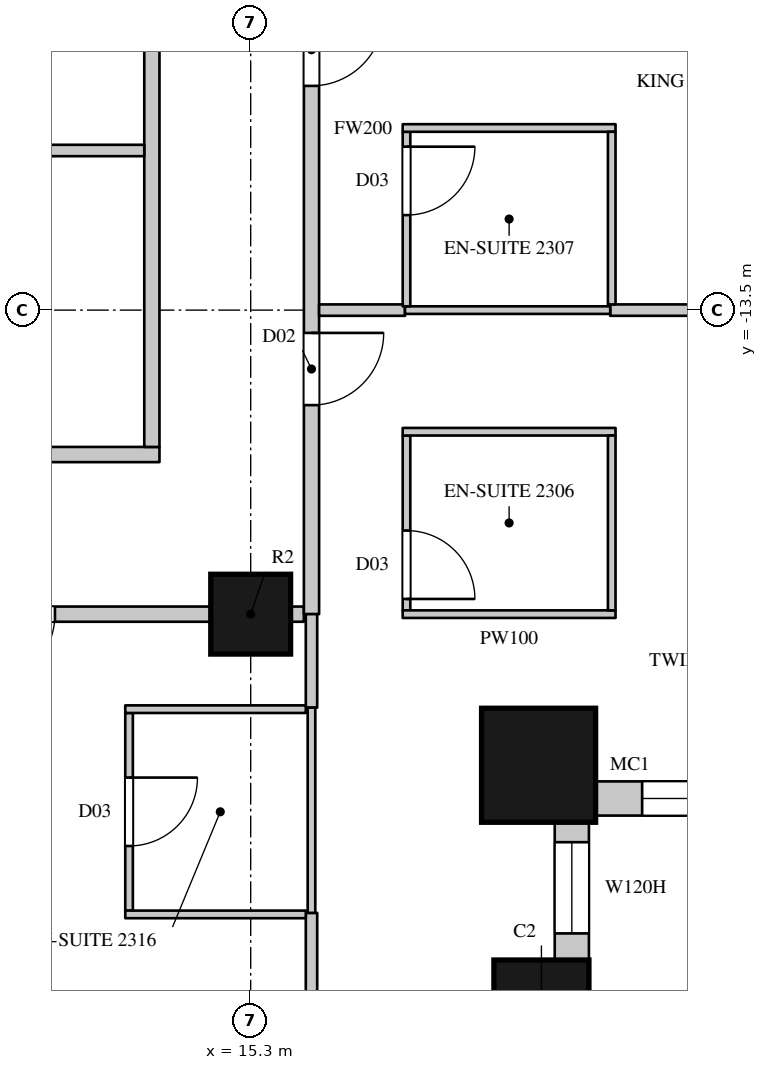
"""IFC4 building model, lengths in metres.
Left out: names, types, materials, properties, quantities, classifications, styles, units other than length and angle.
Written with IfcOpenShell. Run it as: python <this file> out.ifc"""

import sys

from ifc_helpers import new_model, si_unit, direction, frame, frame_2d, origin, origin_2d, place, context, subcontext, project, spatial, rectangle, circle, extrude, element, fill, save


model = new_model("IFC4")
c1 = context("Model", 3, precision=1e-05, world=origin(), true_north=direction((0.0, 1.0)))
c2 = subcontext(c1, "Body", "Model", "MODEL_VIEW")
j1 = project(units=[si_unit("LENGTHUNIT", "METRE"), si_unit("PLANEANGLEUNIT", "RADIAN")], contexts=[c1])
p1 = place(None, origin())
s1 = spatial("IfcSite", under=j1, at=p1, CompositionType="ELEMENT")
p2 = place(p1, origin())
s2 = spatial("IfcBuilding", under=s1, at=p2, CompositionType="ELEMENT")
p3 = place(p2, frame((0.0, 0.0, 113.1)))
s3 = spatial("IfcBuildingStorey", under=s2, at=p3, CompositionType="ELEMENT", Elevation=113.1)
p4 = place(p3, frame((19.125, -22.5, 0.0), z_axis=(0.0, 0.0, 1.0), x_axis=(0.0, 1.0, 0.0)))
e1 = element("IfcColumn", 1, at=p4, inside=s3, PredefinedType="COLUMN", context=c2, shape_type="SweptSolid", body=[
    extrude(rectangle(XDim=0.9, YDim=1.25, at=origin_2d()), origin(), (0.0, 0.0, 1.0), 3.6),
])
p5 = place(p3, frame((19.088, -19.488, 0.0), z_axis=(0.0, 0.0, 1.0), x_axis=(1.0, 0.0, 0.0)))
e2 = element("IfcColumn", 2, at=p5, inside=s3, PredefinedType="COLUMN", context=c2, shape_type="SweptSolid", body=[
    extrude(circle(Radius=0.75, at=origin_2d()), origin(), (0.0, 0.0, 1.0), 3.6),
])
p6 = place(p3, frame((15.3, -17.5, 0.0), z_axis=(0.0, 0.0, 1.0), x_axis=(1.0, 0.0, 0.0)))
e3 = element("IfcColumn", 3, at=p6, inside=s3, PredefinedType="COLUMN", context=c2, shape_type="SweptSolid", body=[
    extrude(circle(Radius=0.525, at=origin_2d()), origin(), (0.0, 0.0, 1.0), 3.6),
])
p7 = place(p3, frame((19.525, -22.05, 0.0), z_axis=(0.0, 0.0, 1.0), x_axis=(0.0, 1.0, 0.0)))
e4 = element("IfcWall", 4, at=p7, inside=s3, PredefinedType="SOLIDWALL", context=c2, shape_type="SweptSolid", body=[
    extrude(rectangle(XDim=1.843, YDim=0.45, at=frame_2d((0.921, 0.0))), origin(), (0.0, 0.0, 1.0), 3.3),
])
p8 = place(p7, frame((0.35, 0.0, 1.05)))
e5 = element("IfcOpeningElement", 5, at=p8, cuts=e4, PredefinedType="OPENING", context=c2, shape_type="SweptSolid", body=[
    extrude(rectangle(XDim=1.2, YDim=2.0, at=frame_2d((0.6, 1.0))), frame((0.0, 0.235, 0.0), z_axis=(0.0, -1.0, 0.0), x_axis=(1.0, 0.0, 0.0)), (0.0, 0.0, 1.0), 0.47),
])
p9 = place(p3, frame((19.807, -19.925, 0.0), z_axis=(0.0, 0.0, 1.0), x_axis=(1.0, 0.0, 0.0)))
e6 = element("IfcWall", 6, at=p9, inside=s3, PredefinedType="SOLIDWALL", context=c2, shape_type="SweptSolid", body=[
    extrude(rectangle(XDim=3.857, YDim=0.45, at=frame_2d((1.928, 0.0))), origin(), (0.0, 0.0, 1.0), 3.3),
])
p10 = place(p9, frame((0.643, 0.0, 1.05)))
e7 = element("IfcOpeningElement", 7, at=p10, cuts=e6, PredefinedType="OPENING", context=c2, shape_type="SweptSolid", body=[
    extrude(rectangle(XDim=2.7, YDim=2.0, at=frame_2d((1.35, 1.0))), frame((0.0, 0.235, 0.0), z_axis=(0.0, -1.0, 0.0), x_axis=(1.0, 0.0, 0.0)), (0.0, 0.0, 1.0), 0.47),
])
p11 = place(p3, frame((6.825, -17.5, 0.0), z_axis=(0.0, 0.0, 1.0), x_axis=(1.0, 0.0, 0.0)))
e8 = element("IfcWall", 8, at=p11, inside=s3, PredefinedType="PARTITIONING", context=c2, shape_type="SweptSolid", body=[
    extrude(rectangle(XDim=7.95, YDim=0.2, at=frame_2d((3.975, 0.0))), origin(), (0.0, 0.0, 1.0), 2.75),
])
p12 = place(p11, frame((2.45, 0.0, 0.0)))
e9 = element("IfcOpeningElement", 9, at=p12, cuts=e8, PredefinedType="OPENING", context=c2, shape_type="SweptSolid", body=[
    extrude(rectangle(XDim=0.95, YDim=2.2, at=frame_2d((0.475, 1.1))), frame((0.0, 0.11, 0.0), z_axis=(0.0, -1.0, 0.0), x_axis=(1.0, 0.0, 0.0)), (0.0, 0.0, 1.0), 0.22),
])
p13 = place(p11, frame((4.95, 0.0, 0.0)))
e10 = element("IfcOpeningElement", 10, at=p13, cuts=e8, PredefinedType="OPENING", context=c2, shape_type="SweptSolid", body=[
    extrude(rectangle(XDim=0.95, YDim=2.2, at=frame_2d((0.475, 1.1))), frame((0.0, 0.11, 0.0), z_axis=(0.0, -1.0, 0.0), x_axis=(1.0, 0.0, 0.0)), (0.0, 0.0, 1.0), 0.22),
])
p14 = place(p3, frame((15.825, -17.5, 0.0), z_axis=(0.0, 0.0, 1.0), x_axis=(1.0, 0.0, 0.0)))
e11 = element("IfcWall", 11, at=p14, inside=s3, PredefinedType="PARTITIONING", context=c2, shape_type="SweptSolid", body=[
    extrude(rectangle(XDim=0.175, YDim=0.2, at=frame_2d((0.087, 0.0))), origin(), (0.0, 0.0, 1.0), 3.3),
])
p15 = place(p3, frame((-6.1, -15.4, 0.0), z_axis=(0.0, 0.0, 1.0), x_axis=(1.0, 0.0, 0.0)))
e12 = element("IfcWall", 12, at=p15, inside=s3, PredefinedType="PARTITIONING", context=c2, shape_type="SweptSolid", body=[
    extrude(rectangle(XDim=20.2, YDim=0.2, at=frame_2d((10.1, 0.0))), origin(), (0.0, 0.0, 1.0), 3.3),
])
p16 = place(p15, frame((5.95, 0.0, 0.0)))
e13 = element("IfcOpeningElement", 13, at=p16, cuts=e12, PredefinedType="OPENING", context=c2, shape_type="SweptSolid", body=[
    extrude(rectangle(XDim=0.9, YDim=2.2, at=frame_2d((0.45, 1.1))), frame((0.0, 0.11, 0.0), z_axis=(0.0, -1.0, 0.0), x_axis=(1.0, 0.0, 0.0)), (0.0, 0.0, 1.0), 0.22),
])
p17 = place(p15, frame((16.1, 0.0, 0.0)))
e14 = element("IfcOpeningElement", 14, at=p17, cuts=e12, PredefinedType="OPENING", context=c2, shape_type="SweptSolid", body=[
    extrude(rectangle(XDim=0.9, YDim=2.2, at=frame_2d((0.45, 1.1))), frame((0.0, 0.11, 0.0), z_axis=(0.0, -1.0, 0.0), x_axis=(1.0, 0.0, 0.0)), (0.0, 0.0, 1.0), 0.22),
])
p18 = place(p3, frame((14.0, -15.3, 0.0), z_axis=(0.0, 0.0, 1.0), x_axis=(0.0, 1.0, 0.0)))
e15 = element("IfcWall", 15, at=p18, inside=s3, PredefinedType="PARTITIONING", context=c2, shape_type="SweptSolid", body=[
    extrude(rectangle(XDim=8.475, YDim=0.2, at=frame_2d((4.238, 0.0))), origin(), (0.0, 0.0, 1.0), 3.3),
])
p19 = place(p3, frame((16.1, -17.5, 0.0), z_axis=(0.0, 0.0, 1.0), x_axis=(0.0, 1.0, 0.0)))
e16 = element("IfcWall", 16, at=p19, inside=s3, PredefinedType="PARTITIONING", context=c2, shape_type="SweptSolid", body=[
    extrude(rectangle(XDim=12.75, YDim=0.2, at=frame_2d((6.375, 0.0))), origin(), (0.0, 0.0, 1.0), 3.3),
])
p20 = place(p19, frame((2.75, 0.0, 0.0)))
e17 = element("IfcOpeningElement", 17, at=p20, cuts=e16, PredefinedType="OPENING", context=c2, shape_type="SweptSolid", body=[
    extrude(rectangle(XDim=0.95, YDim=2.2, at=frame_2d((0.475, 1.1))), frame((0.0, 0.11, 0.0), z_axis=(0.0, -1.0, 0.0), x_axis=(1.0, 0.0, 0.0)), (0.0, 0.0, 1.0), 0.22),
])
p21 = place(p19, frame((6.95, 0.0, 0.0)))
e18 = element("IfcOpeningElement", 18, at=p21, cuts=e16, PredefinedType="OPENING", context=c2, shape_type="SweptSolid", body=[
    extrude(rectangle(XDim=0.95, YDim=2.2, at=frame_2d((0.475, 1.1))), frame((0.0, 0.11, 0.0), z_axis=(0.0, -1.0, 0.0), x_axis=(1.0, 0.0, 0.0)), (0.0, 0.0, 1.0), 0.22),
])
p22 = place(p19, frame((11.4, 0.0, 0.0)))
e19 = element("IfcOpeningElement", 19, at=p22, cuts=e16, PredefinedType="OPENING", context=c2, shape_type="SweptSolid", body=[
    extrude(rectangle(XDim=0.95, YDim=2.2, at=frame_2d((0.475, 1.1))), frame((0.0, 0.11, 0.0), z_axis=(0.0, -1.0, 0.0), x_axis=(1.0, 0.0, 0.0)), (0.0, 0.0, 1.0), 0.22),
])
p23 = place(p3, frame((10.4, -11.4, 0.0), z_axis=(0.0, 0.0, 1.0), x_axis=(1.0, 0.0, 0.0)))
e20 = element("IfcWall", 20, at=p23, inside=s3, PredefinedType="PARTITIONING", context=c2, shape_type="SweptSolid", body=[
    extrude(rectangle(XDim=3.5, YDim=0.15, at=frame_2d((1.75, 0.0))), origin(), (0.0, 0.0, 1.0), 3.3),
])
p24 = place(p3, frame((16.1, -25.7, 0.0), z_axis=(0.0, 0.0, 1.0), x_axis=(0.0, 1.0, 0.0)))
e21 = element("IfcWall", 21, at=p24, inside=s3, PredefinedType="PARTITIONING", context=c2, shape_type="SweptSolid", body=[
    extrude(rectangle(XDim=4.27, YDim=0.15, at=frame_2d((2.135, 0.0))), origin(), (0.0, 0.0, 1.0), 3.3),
])
p25 = place(p3, frame((16.1, -18.73, 0.0), z_axis=(0.0, 0.0, 1.0), x_axis=(0.0, 1.0, 0.0)))
e22 = element("IfcWall", 22, at=p25, inside=s3, PredefinedType="PARTITIONING", context=c2, shape_type="SweptSolid", body=[
    extrude(rectangle(XDim=1.23, YDim=0.15, at=frame_2d((0.615, 0.0))), origin(), (0.0, 0.0, 1.0), 3.3),
])
p26 = place(p3, frame((16.2, -13.5, 0.0), z_axis=(0.0, 0.0, 1.0), x_axis=(1.0, 0.0, 0.0)))
e23 = element("IfcWall", 23, at=p26, inside=s3, PredefinedType="PARTITIONING", context=c2, shape_type="SweptSolid", body=[
    extrude(rectangle(XDim=1.13, YDim=0.15, at=frame_2d((0.565, 0.0))), origin(), (0.0, 0.0, 1.0), 3.3),
])
p27 = place(p3, frame((20.03, -13.5, 0.0), z_axis=(0.0, 0.0, 1.0), x_axis=(1.0, 0.0, 0.0)))
e24 = element("IfcWall", 24, at=p27, inside=s3, PredefinedType="PARTITIONING", context=c2, shape_type="SweptSolid", body=[
    extrude(rectangle(XDim=3.47, YDim=0.15, at=frame_2d((1.735, 0.0))), origin(), (0.0, 0.0, 1.0), 3.3),
])
p28 = place(p3, frame((13.7, -21.4, 0.0), z_axis=(0.0, 0.0, 1.0), x_axis=(0.0, 1.0, 0.0)))
e25 = element("IfcWall", 25, at=p28, inside=s3, PredefinedType="PARTITIONING", context=c2, shape_type="SweptSolid", body=[
    extrude(rectangle(XDim=2.6, YDim=0.1, at=frame_2d((1.3, 0.0))), origin(), (0.0, 0.0, 1.0), 3.3),
])
p29 = place(p28, frame((0.85, 0.0, 0.0)))
e26 = element("IfcOpeningElement", 26, at=p29, cuts=e25, PredefinedType="OPENING", context=c2, shape_type="SweptSolid", body=[
    extrude(rectangle(XDim=0.9, YDim=2.2, at=frame_2d((0.45, 1.1))), frame((0.0, 0.06, 0.0), z_axis=(0.0, -1.0, 0.0), x_axis=(1.0, 0.0, 0.0)), (0.0, 0.0, 1.0), 0.12),
])
for number, where, z_axis, x_axis in (
    (27, (13.65, -21.45, 0.0), (0.0, 0.0, 1.0), (1.0, 0.0, 0.0)),
    (28, (13.65, -18.75, 0.0), (0.0, 0.0, 1.0), (1.0, 0.0, 0.0)),
):
    element("IfcWall", number, at=place(p3, frame(where, z_axis=z_axis, x_axis=x_axis)), inside=s3, PredefinedType="PARTITIONING", context=c2, shape_type="SweptSolid", body=[
        extrude(rectangle(XDim=2.375, YDim=0.1, at=frame_2d((1.188, 0.0))), origin(), (0.0, 0.0, 1.0), 3.3),
    ])
for number, where, z_axis, x_axis in (
    (29, (16.1, -21.43, 0.0), (0.0, 0.0, 1.0), (0.0, 1.0, 0.0)),
    (30, (17.33, -13.5, 0.0), (0.0, 0.0, 1.0), (1.0, 0.0, 0.0)),
):
    element("IfcWall", number, at=place(p3, frame(where, z_axis=z_axis, x_axis=x_axis)), inside=s3, PredefinedType="PARTITIONING", context=c2, shape_type="SweptSolid", body=[
        extrude(rectangle(XDim=2.7, YDim=0.1, at=frame_2d((1.35, 0.0))), origin(), (0.0, 0.0, 1.0), 3.3),
    ])
p30 = place(p3, frame((17.35, -17.45, 0.0), z_axis=(0.0, 0.0, 1.0), x_axis=(0.0, 1.0, 0.0)))
e31 = element("IfcWall", 31, at=p30, inside=s3, PredefinedType="PARTITIONING", context=c2, shape_type="SweptSolid", body=[
    extrude(rectangle(XDim=2.3, YDim=0.1, at=frame_2d((1.15, 0.0))), origin(), (0.0, 0.0, 1.0), 3.3),
])
p31 = place(p30, frame((0.15, 0.0, 0.0)))
e32 = element("IfcOpeningElement", 32, at=p31, cuts=e31, PredefinedType="OPENING", context=c2, shape_type="SweptSolid", body=[
    extrude(rectangle(XDim=0.9, YDim=2.2, at=frame_2d((0.45, 1.1))), frame((0.0, 0.06, 0.0), z_axis=(0.0, -1.0, 0.0), x_axis=(1.0, 0.0, 0.0)), (0.0, 0.0, 1.0), 0.12),
])
for number, where, z_axis, x_axis in (
    (33, (17.3, -17.5, 0.0), (0.0, 0.0, 1.0), (1.0, 0.0, 0.0)),
    (34, (17.3, -15.1, 0.0), (0.0, 0.0, 1.0), (1.0, 0.0, 0.0)),
):
    element("IfcWall", number, at=place(p3, frame(where, z_axis=z_axis, x_axis=x_axis)), inside=s3, PredefinedType="PARTITIONING", context=c2, shape_type="SweptSolid", body=[
        extrude(rectangle(XDim=2.8, YDim=0.1, at=frame_2d((1.4, 0.0))), origin(), (0.0, 0.0, 1.0), 3.3),
    ])
p32 = place(p3, frame((17.35, -13.45, 0.0), z_axis=(0.0, 0.0, 1.0), x_axis=(0.0, 1.0, 0.0)))
e35 = element("IfcWall", 35, at=p32, inside=s3, PredefinedType="PARTITIONING", context=c2, shape_type="SweptSolid", body=[
    extrude(rectangle(XDim=2.296, YDim=0.1, at=frame_2d((1.148, 0.0))), origin(), (0.0, 0.0, 1.0), 3.3),
])
p33 = place(p32, frame((1.2, 0.0, 0.0)))
e36 = element("IfcOpeningElement", 36, at=p33, cuts=e35, PredefinedType="OPENING", context=c2, shape_type="SweptSolid", body=[
    extrude(rectangle(XDim=0.9, YDim=2.2, at=frame_2d((0.45, 1.1))), frame((0.0, 0.06, 0.0), z_axis=(0.0, -1.0, 0.0), x_axis=(1.0, 0.0, 0.0)), (0.0, 0.0, 1.0), 0.12),
])
p34 = place(p3, frame((17.3, -11.104, 0.0), z_axis=(0.0, 0.0, 1.0), x_axis=(1.0, 0.0, 0.0)))
e37 = element("IfcWall", 37, at=p34, inside=s3, PredefinedType="PARTITIONING", context=c2, shape_type="SweptSolid", body=[
    extrude(rectangle(XDim=2.8, YDim=0.1, at=frame_2d((1.4, 0.0))), origin(), (0.0, 0.0, 1.0), 3.3),
])
p35 = place(p3, frame((20.05, -17.45, 0.0), z_axis=(0.0, 0.0, 1.0), x_axis=(0.0, 1.0, 0.0)))
e38 = element("IfcWall", 38, at=p35, inside=s3, PredefinedType="PARTITIONING", context=c2, shape_type="SweptSolid", body=[
    extrude(rectangle(XDim=2.3, YDim=0.1, at=frame_2d((1.15, 0.0))), origin(), (0.0, 0.0, 1.0), 3.3),
])
p36 = place(p3, frame((20.05, -13.425, 0.0), z_axis=(0.0, 0.0, 1.0), x_axis=(0.0, 1.0, 0.0)))
e39 = element("IfcWall", 39, at=p36, inside=s3, PredefinedType="PARTITIONING", context=c2, shape_type="SweptSolid", body=[
    extrude(rectangle(XDim=2.271, YDim=0.1, at=frame_2d((1.135, 0.0))), origin(), (0.0, 0.0, 1.0), 3.3),
])
p37 = place(p8, origin())
e40 = element("IfcWindow", 40, at=p37, inside=s3, PartitioningType="SINGLE_PANEL", PredefinedType="WINDOW", context=c2, shape_type="SweptSolid", body=[
    extrude(rectangle(XDim=1.2, YDim=2.0, at=frame_2d((0.6, 1.0))), frame((0.0, 0.135, 0.0), z_axis=(0.0, -1.0, 0.0), x_axis=(1.0, 0.0, 0.0)), (0.0, 0.0, 1.0), 0.06),
])
fill(e5, e40)
p38 = place(p10, origin())
e41 = element("IfcWindow", 41, at=p38, inside=s3, PartitioningType="SINGLE_PANEL", PredefinedType="WINDOW", context=c2, shape_type="SweptSolid", body=[
    extrude(rectangle(XDim=2.7, YDim=2.0, at=frame_2d((1.35, 1.0))), frame((0.0, 0.135, 0.0), z_axis=(0.0, -1.0, 0.0), x_axis=(1.0, 0.0, 0.0)), (0.0, 0.0, 1.0), 0.06),
])
fill(e7, e41)
p39 = place(p20, origin())
e42 = element("IfcDoor", 42, at=p39, inside=s3, OperationType="SINGLE_SWING_LEFT", PredefinedType="DOOR", context=c2, shape_type="SweptSolid", body=[
    extrude(rectangle(XDim=0.95, YDim=2.2, at=frame_2d((0.475, 1.1))), frame((0.0, 0.025, 0.0), z_axis=(0.0, -1.0, 0.0), x_axis=(1.0, 0.0, 0.0)), (0.0, 0.0, 1.0), 0.05),
])
fill(e17, e42)
p40 = place(p31, origin())
e43 = element("IfcDoor", 43, at=p40, inside=s3, OperationType="SINGLE_SWING_RIGHT", PredefinedType="DOOR", context=c2, shape_type="SweptSolid", body=[
    extrude(rectangle(XDim=0.9, YDim=2.2, at=frame_2d((0.45, 1.1))), frame((0.0, 0.025, 0.0), z_axis=(0.0, -1.0, 0.0), x_axis=(1.0, 0.0, 0.0)), (0.0, 0.0, 1.0), 0.05),
])
fill(e32, e43)
p41 = place(p21, origin())
e44 = element("IfcDoor", 44, at=p41, inside=s3, OperationType="SINGLE_SWING_LEFT", PredefinedType="DOOR", context=c2, shape_type="SweptSolid", body=[
    extrude(rectangle(XDim=0.95, YDim=2.2, at=frame_2d((0.475, 1.1))), frame((0.0, 0.025, 0.0), z_axis=(0.0, -1.0, 0.0), x_axis=(1.0, 0.0, 0.0)), (0.0, 0.0, 1.0), 0.05),
])
fill(e18, e44)
p42 = place(p33, origin())
e45 = element("IfcDoor", 45, at=p42, inside=s3, OperationType="SINGLE_SWING_LEFT", PredefinedType="DOOR", context=c2, shape_type="SweptSolid", body=[
    extrude(rectangle(XDim=0.9, YDim=2.2, at=frame_2d((0.45, 1.1))), frame((0.0, 0.025, 0.0), z_axis=(0.0, -1.0, 0.0), x_axis=(1.0, 0.0, 0.0)), (0.0, 0.0, 1.0), 0.05),
])
fill(e36, e45)
p43 = place(p13, origin())
e46 = element("IfcDoor", 46, at=p43, inside=s3, OperationType="SINGLE_SWING_RIGHT", PredefinedType="DOOR", context=c2, shape_type="SweptSolid", body=[
    extrude(rectangle(XDim=0.95, YDim=2.2, at=frame_2d((0.475, 1.1))), frame((0.0, 0.025, 0.0), z_axis=(0.0, -1.0, 0.0), x_axis=(1.0, 0.0, 0.0)), (0.0, 0.0, 1.0), 0.05),
])
fill(e10, e46)
p44 = place(p29, origin())
e47 = element("IfcDoor", 47, at=p44, inside=s3, OperationType="SINGLE_SWING_LEFT", PredefinedType="DOOR", context=c2, shape_type="SweptSolid", body=[
    extrude(rectangle(XDim=0.9, YDim=2.2, at=frame_2d((0.45, 1.1))), frame((0.0, 0.025, 0.0), z_axis=(0.0, -1.0, 0.0), x_axis=(1.0, 0.0, 0.0)), (0.0, 0.0, 1.0), 0.05),
])
fill(e26, e47)
save(model, sys.argv[1])
